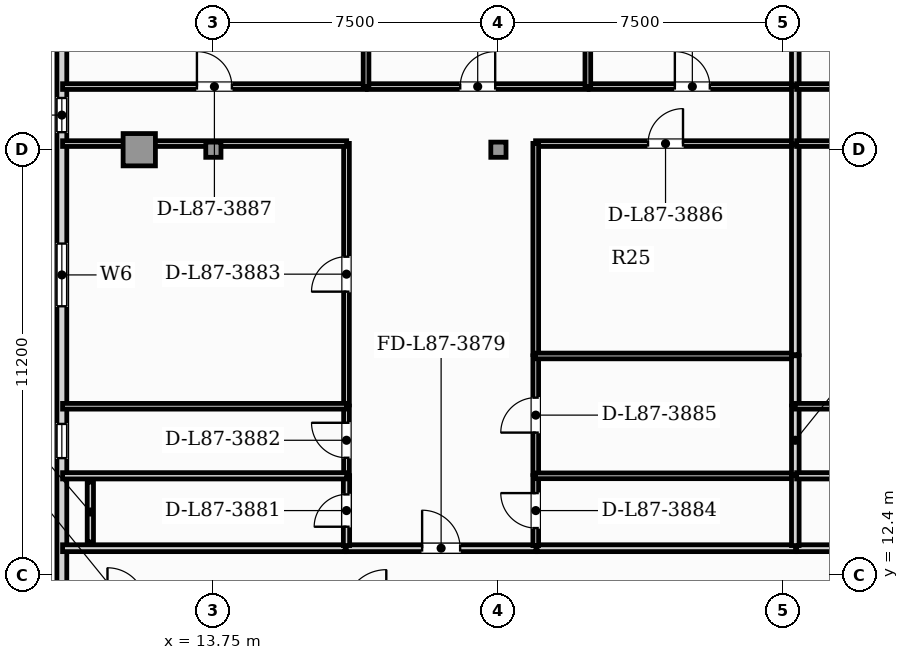
"""IFC4 building model, lengths in metres.
Left out: names, types, materials, properties, quantities, classifications, styles, units other than length and angle.
Written with IfcOpenShell. Run it as: python <this file> out.ifc"""

import sys

from ifc_helpers import new_model, si_unit, direction, frame, frame_2d, origin, origin_2d, place, context, subcontext, project, spatial, rectangle, hollow_rectangle, extrude, element, fill, save


model = new_model("IFC4")
c1 = context("Model", 3, precision=1e-05, world=origin(), true_north=direction((0.0, 1.0)))
c2 = subcontext(c1, "Body", "Model", "MODEL_VIEW")
j1 = project(units=[si_unit("LENGTHUNIT", "METRE"), si_unit("PLANEANGLEUNIT", "RADIAN")], contexts=[c1])
p1 = place(None, origin())
s1 = spatial("IfcSite", under=j1, at=p1, CompositionType="ELEMENT")
p2 = place(p1, origin())
s2 = spatial("IfcBuilding", under=s1, at=p2, CompositionType="ELEMENT")
p3 = place(p2, frame((0.0, 0.0, 353.45)))
s3 = spatial("IfcBuildingStorey", under=s2, at=p3, CompositionType="ELEMENT", Elevation=353.45)
p4 = place(p3, frame((11.8, 23.6, 0.0), z_axis=(0.0, 0.0, 1.0), x_axis=(1.0, 0.0, 0.0)))
e1 = element("IfcColumn", 1, at=p4, inside=s3, PredefinedType="USERDEFINED", context=c2, shape_type="SweptSolid", body=[
    extrude(hollow_rectangle(XDim=0.85, YDim=0.85, WallThickness=0.05, at=origin_2d()), origin(), (0.0, 0.0, 1.0), 4.4),
])
for number, where, z_axis, x_axis in (
    (2, (13.75, 23.6, 0.0), (0.0, 0.0, 1.0), (1.0, 0.0, 0.0)),
    (3, (21.25, 23.6, 0.0), (0.0, 0.0, 1.0), (1.0, 0.0, 0.0)),
):
    element("IfcColumn", number, at=place(p3, frame(where, z_axis=z_axis, x_axis=x_axis)), inside=s3, PredefinedType="COLUMN", context=c2, shape_type="SweptSolid", body=[
        extrude(hollow_rectangle(XDim=0.4, YDim=0.4, WallThickness=0.02, at=origin_2d()), origin(), (0.0, 0.0, 1.0), 4.4),
    ])
p5 = place(p3, frame((9.763, 27.791, 0.0), z_axis=(0.0, 0.0, 1.0), x_axis=(0.0, -1.0, 0.0)))
e4 = element("IfcWall", 4, at=p5, inside=s3, PredefinedType="SOLIDWALL", context=c2, shape_type="SweptSolid", body=[
    extrude(rectangle(XDim=24.551, YDim=0.26, at=frame_2d((12.276, 0.0))), origin(), (0.0, 0.0, 1.0), 4.14),
])
p6 = place(p5, frame((18.651, 0.0, 0.85)))
e5 = element("IfcOpeningElement", 5, at=p6, cuts=e4, PredefinedType="OPENING", context=c2, shape_type="SweptSolid", body=[
    extrude(rectangle(XDim=2.1, YDim=2.05, at=frame_2d((1.05, 1.025))), frame((0.0, 0.14, 0.0), z_axis=(0.0, -1.0, 0.0), x_axis=(1.0, 0.0, 0.0)), (0.0, 0.0, 1.0), 0.28),
])
p7 = place(p5, frame((2.83, 0.0, 0.95)))
e6 = element("IfcOpeningElement", 6, at=p7, cuts=e4, PredefinedType="OPENING", context=c2, shape_type="SweptSolid", body=[
    extrude(rectangle(XDim=0.9, YDim=1.5, at=frame_2d((0.45, 0.75))), frame((0.0, 0.14, 0.0), z_axis=(0.0, -1.0, 0.0), x_axis=(1.0, 0.0, 0.0)), (0.0, 0.0, 1.0), 0.28),
])
p8 = place(p5, frame((11.406, 0.0, 0.95)))
e7 = element("IfcOpeningElement", 7, at=p8, cuts=e4, PredefinedType="OPENING", context=c2, shape_type="SweptSolid", body=[
    extrude(rectangle(XDim=0.9, YDim=1.5, at=frame_2d((0.45, 0.75))), frame((0.0, 0.14, 0.0), z_axis=(0.0, -1.0, 0.0), x_axis=(1.0, 0.0, 0.0)), (0.0, 0.0, 1.0), 0.28),
])
p9 = place(p5, frame((6.661, 0.0, 0.88)))
e8 = element("IfcOpeningElement", 8, at=p9, cuts=e4, PredefinedType="OPENING", context=c2, shape_type="SweptSolid", body=[
    extrude(rectangle(XDim=1.65, YDim=2.0, at=frame_2d((0.825, 1.0))), frame((0.0, 0.14, 0.0), z_axis=(0.0, -1.0, 0.0), x_axis=(1.0, 0.0, 0.0)), (0.0, 0.0, 1.0), 0.28),
])
p10 = place(p3, frame((17.248, 13.115, 0.0), z_axis=(0.0, 0.0, 1.0), x_axis=(1.0, 0.0, 0.0)))
e9 = element("IfcWall", 9, at=p10, inside=s3, PredefinedType="PARTITIONING", context=c2, shape_type="SweptSolid", body=[
    extrude(rectangle(XDim=4.99, YDim=0.18, at=frame_2d((2.495, 0.0))), origin(), (0.0, 0.0, 1.0), 4.14),
])
p11 = place(p10, frame((1.995, 0.0, 0.0)))
e10 = element("IfcOpeningElement", 10, at=p11, cuts=e9, PredefinedType="OPENING", context=c2, shape_type="SweptSolid", body=[
    extrude(rectangle(XDim=1.0, YDim=2.15, at=frame_2d((0.5, 1.075))), frame((0.0, 0.1, 0.0), z_axis=(0.0, -1.0, 0.0), x_axis=(1.0, 0.0, 0.0)), (0.0, 0.0, 1.0), 0.2),
])
p12 = place(p3, frame((9.782, 13.115, 0.0), z_axis=(0.0, 0.0, 1.0), x_axis=(1.0, 0.0, 0.0)))
e11 = element("IfcWall", 11, at=p12, inside=s3, PredefinedType="PARTITIONING", context=c2, shape_type="SweptSolid", body=[
    extrude(rectangle(XDim=7.435, YDim=0.18, at=frame_2d((3.718, 0.0))), origin(), (0.0, 0.0, 1.0), 4.14),
])
p13 = place(p3, frame((22.268, 13.115, 0.0), z_axis=(0.0, 0.0, 1.0), x_axis=(1.0, 0.0, 0.0)))
e12 = element("IfcWall", 12, at=p13, inside=s3, PredefinedType="PARTITIONING", context=c2, shape_type="SweptSolid", body=[
    extrude(rectangle(XDim=6.8, YDim=0.18, at=frame_2d((3.4, 0.0))), origin(), (0.0, 0.0, 1.0), 4.14),
])
p14 = place(p3, frame((29.097, 13.115, 0.0), z_axis=(0.0, 0.0, 1.0), x_axis=(1.0, 0.0, 0.0)))
e13 = element("IfcWall", 13, at=p14, inside=s3, PredefinedType="PARTITIONING", context=c2, shape_type="SweptSolid", body=[
    extrude(rectangle(XDim=6.373, YDim=0.18, at=frame_2d((3.187, 0.0))), origin(), (0.0, 0.0, 1.0), 4.14),
])
p15 = place(p3, frame((17.252, 13.185, 0.0), z_axis=(0.0, 0.0, 1.0), x_axis=(0.0, 1.0, 0.0)))
e14 = element("IfcWall", 14, at=p15, inside=s3, PredefinedType="PLUMBINGWALL", context=c2, shape_type="SweptSolid", body=[
    extrude(rectangle(XDim=1.84, YDim=0.165, at=frame_2d((0.92, 0.0))), origin(), (0.0, 0.0, 1.0), 4.14),
])
p16 = place(p15, frame((0.495, 0.0, 0.0)))
e15 = element("IfcOpeningElement", 15, at=p16, cuts=e14, PredefinedType="OPENING", context=c2, shape_type="SweptSolid", body=[
    extrude(rectangle(XDim=0.85, YDim=2.1, at=frame_2d((0.425, 1.05))), frame((0.0, 0.093, 0.0), z_axis=(0.0, -1.0, 0.0), x_axis=(1.0, 0.0, 0.0)), (0.0, 0.0, 1.0), 0.185),
])
p17 = place(p3, frame((17.252, 15.055, 0.0), z_axis=(0.0, 0.0, 1.0), x_axis=(0.0, 1.0, 0.0)))
e16 = element("IfcWall", 16, at=p17, inside=s3, PredefinedType="PARTITIONING", context=c2, shape_type="SweptSolid", body=[
    extrude(rectangle(XDim=1.8, YDim=0.15, at=frame_2d((0.9, 0.0))), origin(), (0.0, 0.0, 1.0), 4.14),
])
p18 = place(p17, frame((0.44, 0.0, 0.0)))
e17 = element("IfcOpeningElement", 17, at=p18, cuts=e16, PredefinedType="OPENING", context=c2, shape_type="SweptSolid", body=[
    extrude(rectangle(XDim=0.92, YDim=2.1, at=frame_2d((0.46, 1.05))), frame((0.0, 0.085, 0.0), z_axis=(0.0, -1.0, 0.0), x_axis=(1.0, 0.0, 0.0)), (0.0, 0.0, 1.0), 0.17),
])
p19 = place(p3, frame((17.252, 16.885, 0.0), z_axis=(0.0, 0.0, 1.0), x_axis=(0.0, 1.0, 0.0)))
e18 = element("IfcWall", 18, at=p19, inside=s3, PredefinedType="PARTITIONING", context=c2, shape_type="SweptSolid", body=[
    extrude(rectangle(XDim=6.881, YDim=0.15, at=frame_2d((3.44, 0.0))), origin(), (0.0, 0.0, 1.0), 4.14),
])
p20 = place(p19, frame((2.981, 0.0, 0.0)))
e19 = element("IfcOpeningElement", 19, at=p20, cuts=e18, PredefinedType="OPENING", context=c2, shape_type="SweptSolid", body=[
    extrude(rectangle(XDim=0.92, YDim=2.1, at=frame_2d((0.46, 1.05))), frame((0.0, 0.085, 0.0), z_axis=(0.0, -1.0, 0.0), x_axis=(1.0, 0.0, 0.0)), (0.0, 0.0, 1.0), 0.17),
])
p21 = place(p3, frame((9.782, 23.761, 0.0), z_axis=(0.0, 0.0, 1.0), x_axis=(1.0, 0.0, 0.0)))
e20 = element("IfcWall", 20, at=p21, inside=s3, PredefinedType="PARTITIONING", context=c2, shape_type="SweptSolid", body=[
    extrude(rectangle(XDim=7.475, YDim=0.15, at=frame_2d((3.738, 0.0))), origin(), (0.0, 0.0, 1.0), 3.607),
])
p22 = place(p3, frame((22.232, 13.185, 0.0), z_axis=(0.0, 0.0, 1.0), x_axis=(0.0, 1.0, 0.0)))
e21 = element("IfcWall", 21, at=p22, inside=s3, PredefinedType="PARTITIONING", context=c2, shape_type="SweptSolid", body=[
    extrude(rectangle(XDim=1.84, YDim=0.15, at=frame_2d((0.92, 0.0))), origin(), (0.0, 0.0, 1.0), 4.14),
])
p23 = place(p22, frame((0.46, 0.0, 0.0)))
e22 = element("IfcOpeningElement", 22, at=p23, cuts=e21, PredefinedType="OPENING", context=c2, shape_type="SweptSolid", body=[
    extrude(rectangle(XDim=0.92, YDim=2.1, at=frame_2d((0.46, 1.05))), frame((0.0, 0.085, 0.0), z_axis=(0.0, -1.0, 0.0), x_axis=(1.0, 0.0, 0.0)), (0.0, 0.0, 1.0), 0.17),
])
p24 = place(p3, frame((22.232, 15.055, 0.0), z_axis=(0.0, 0.0, 1.0), x_axis=(0.0, 1.0, 0.0)))
e23 = element("IfcWall", 23, at=p24, inside=s3, PredefinedType="PARTITIONING", context=c2, shape_type="SweptSolid", body=[
    extrude(rectangle(XDim=3.124, YDim=0.15, at=frame_2d((1.562, 0.0))), origin(), (0.0, 0.0, 1.0), 4.14),
])
p25 = place(p24, frame((1.102, 0.0, 0.0)))
e24 = element("IfcOpeningElement", 24, at=p25, cuts=e23, PredefinedType="OPENING", context=c2, shape_type="SweptSolid", body=[
    extrude(rectangle(XDim=0.92, YDim=2.1, at=frame_2d((0.46, 1.05))), frame((0.0, 0.085, 0.0), z_axis=(0.0, -1.0, 0.0), x_axis=(1.0, 0.0, 0.0)), (0.0, 0.0, 1.0), 0.17),
])
p26 = place(p3, frame((22.228, 23.761, 0.0), z_axis=(0.0, 0.0, 1.0), x_axis=(1.0, 0.0, 0.0)))
e25 = element("IfcWall", 25, at=p26, inside=s3, PredefinedType="PARTITIONING", context=c2, shape_type="SweptSolid", body=[
    extrude(rectangle(XDim=6.84, YDim=0.15, at=frame_2d((3.42, 0.0))), origin(), (0.0, 0.0, 1.0), 3.24),
])
p27 = place(p26, frame((2.96, 0.0, 0.0)))
e26 = element("IfcOpeningElement", 26, at=p27, cuts=e25, PredefinedType="OPENING", context=c2, shape_type="SweptSolid", body=[
    extrude(rectangle(XDim=0.92, YDim=2.1, at=frame_2d((0.46, 1.05))), frame((0.0, 0.085, 0.0), z_axis=(0.0, -1.0, 0.0), x_axis=(1.0, 0.0, 0.0)), (0.0, 0.0, 1.0), 0.17),
])
p28 = place(p3, frame((22.232, 18.208, 0.0), z_axis=(0.0, 0.0, 1.0), x_axis=(0.0, 1.0, 0.0)))
e27 = element("IfcWall", 27, at=p28, inside=s3, PredefinedType="PARTITIONING", context=c2, shape_type="SweptSolid", body=[
    extrude(rectangle(XDim=5.558, YDim=0.15, at=frame_2d((2.779, 0.0))), origin(), (0.0, 0.0, 1.0), 4.14),
])
p29 = place(p3, frame((9.782, 25.261, 0.0), z_axis=(0.0, 0.0, 1.0), x_axis=(1.0, 0.0, 0.0)))
e28 = element("IfcWall", 28, at=p29, inside=s3, PredefinedType="PARTITIONING", context=c2, shape_type="SweptSolid", body=[
    extrude(rectangle(XDim=7.99, YDim=0.15, at=frame_2d((3.995, 0.0))), origin(), (0.0, 0.0, 1.0), 4.14),
])
p30 = place(p29, frame((3.535, 0.0, 0.0)))
e29 = element("IfcOpeningElement", 29, at=p30, cuts=e28, PredefinedType="OPENING", context=c2, shape_type="SweptSolid", body=[
    extrude(rectangle(XDim=0.92, YDim=2.1, at=frame_2d((0.46, 1.05))), frame((0.0, 0.085, 0.0), z_axis=(0.0, -1.0, 0.0), x_axis=(1.0, 0.0, 0.0)), (0.0, 0.0, 1.0), 0.17),
])
p31 = place(p3, frame((17.802, 25.261, 0.0), z_axis=(0.0, 0.0, 1.0), x_axis=(1.0, 0.0, 0.0)))
e30 = element("IfcWall", 30, at=p31, inside=s3, PredefinedType="PARTITIONING", context=c2, shape_type="SweptSolid", body=[
    extrude(rectangle(XDim=5.806, YDim=0.15, at=frame_2d((2.903, 0.0))), origin(), (0.0, 0.0, 1.0), 4.14),
])
p32 = place(p31, frame((2.443, 0.0, 0.0)))
e31 = element("IfcOpeningElement", 31, at=p32, cuts=e30, PredefinedType="OPENING", context=c2, shape_type="SweptSolid", body=[
    extrude(rectangle(XDim=0.92, YDim=2.1, at=frame_2d((0.46, 1.05))), frame((0.0, 0.085, 0.0), z_axis=(0.0, -1.0, 0.0), x_axis=(1.0, 0.0, 0.0)), (0.0, 0.0, 1.0), 0.17),
])
p33 = place(p3, frame((23.638, 25.261, 0.0), z_axis=(0.0, 0.0, 1.0), x_axis=(1.0, 0.0, 0.0)))
e32 = element("IfcWall", 32, at=p33, inside=s3, PredefinedType="PARTITIONING", context=c2, shape_type="SweptSolid", body=[
    extrude(rectangle(XDim=5.429, YDim=0.15, at=frame_2d((2.714, 0.0))), origin(), (0.0, 0.0, 1.0), 4.14),
])
p34 = place(p33, frame((2.254, 0.0, 0.0)))
e33 = element("IfcOpeningElement", 33, at=p34, cuts=e32, PredefinedType="OPENING", context=c2, shape_type="SweptSolid", body=[
    extrude(rectangle(XDim=0.92, YDim=2.1, at=frame_2d((0.46, 1.05))), frame((0.0, 0.085, 0.0), z_axis=(0.0, -1.0, 0.0), x_axis=(1.0, 0.0, 0.0)), (0.0, 0.0, 1.0), 0.17),
])
p35 = place(p3, frame((29.062, 23.756, 0.0), z_axis=(0.0, 0.0, 1.0), x_axis=(0.0, 1.0, 0.0)))
e34 = element("IfcWall", 34, at=p35, inside=s3, PredefinedType="PARTITIONING", context=c2, shape_type="SweptSolid", body=[
    extrude(rectangle(XDim=1.51, YDim=0.2, at=frame_2d((0.755, 0.0))), origin(), (0.0, 0.0, 1.0), 4.14),
])
p36 = place(p3, frame((9.782, 15.02, 0.0), z_axis=(0.0, 0.0, 1.0), x_axis=(1.0, 0.0, 0.0)))
e35 = element("IfcWall", 35, at=p36, inside=s3, PredefinedType="PLUMBINGWALL", context=c2, shape_type="SweptSolid", body=[
    extrude(rectangle(XDim=7.475, YDim=0.165, at=frame_2d((3.738, 0.0))), origin(), (0.0, 0.0, 1.0), 4.14),
])
p37 = place(p3, frame((9.782, 16.85, 0.0), z_axis=(0.0, 0.0, 1.0), x_axis=(1.0, 0.0, 0.0)))
e36 = element("IfcWall", 36, at=p37, inside=s3, PredefinedType="PARTITIONING", context=c2, shape_type="SweptSolid", body=[
    extrude(rectangle(XDim=7.475, YDim=0.15, at=frame_2d((3.738, 0.0))), origin(), (0.0, 0.0, 1.0), 4.14),
])
p38 = place(p3, frame((22.228, 15.02, 0.0), z_axis=(0.0, 0.0, 1.0), x_axis=(1.0, 0.0, 0.0)))
e37 = element("IfcWall", 37, at=p38, inside=s3, PredefinedType="PARTITIONING", context=c2, shape_type="SweptSolid", body=[
    extrude(rectangle(XDim=6.84, YDim=0.15, at=frame_2d((3.42, 0.0))), origin(), (0.0, 0.0, 1.0), 4.14),
])
p39 = place(p3, frame((29.062, 13.185, 0.0), z_axis=(0.0, 0.0, 1.0), x_axis=(0.0, 1.0, 0.0)))
e38 = element("IfcWall", 38, at=p39, inside=s3, PredefinedType="PARTITIONING", context=c2, shape_type="SweptSolid", body=[
    extrude(rectangle(XDim=1.84, YDim=0.2, at=frame_2d((0.92, 0.0))), origin(), (0.0, 0.0, 1.0), 4.14),
])
p40 = place(p3, frame((22.228, 18.173, 0.0), z_axis=(0.0, 0.0, 1.0), x_axis=(1.0, 0.0, 0.0)))
e39 = element("IfcWall", 39, at=p40, inside=s3, PredefinedType="PARTITIONING", context=c2, shape_type="SweptSolid", body=[
    extrude(rectangle(XDim=6.84, YDim=0.15, at=frame_2d((3.42, 0.0))), origin(), (0.0, 0.0, 1.0), 4.14),
])
p41 = place(p3, frame((29.062, 15.055, 0.0), z_axis=(0.0, 0.0, 1.0), x_axis=(0.0, 1.0, 0.0)))
e40 = element("IfcWall", 40, at=p41, inside=s3, PredefinedType="PARTITIONING", context=c2, shape_type="SweptSolid", body=[
    extrude(rectangle(XDim=1.8, YDim=0.2, at=frame_2d((0.9, 0.0))), origin(), (0.0, 0.0, 1.0), 4.14),
])
p42 = place(p3, frame((29.062, 16.885, 0.0), z_axis=(0.0, 0.0, 1.0), x_axis=(0.0, 1.0, 0.0)))
e41 = element("IfcWall", 41, at=p42, inside=s3, PredefinedType="PARTITIONING", context=c2, shape_type="SweptSolid", body=[
    extrude(rectangle(XDim=1.293, YDim=0.2, at=frame_2d((0.647, 0.0))), origin(), (0.0, 0.0, 1.0), 4.14),
])
p43 = place(p3, frame((29.062, 18.208, 0.0), z_axis=(0.0, 0.0, 1.0), x_axis=(0.0, 1.0, 0.0)))
e42 = element("IfcWall", 42, at=p43, inside=s3, PredefinedType="PARTITIONING", context=c2, shape_type="SweptSolid", body=[
    extrude(rectangle(XDim=5.518, YDim=0.2, at=frame_2d((2.759, 0.0))), origin(), (0.0, 0.0, 1.0), 4.14),
])
for number, where, z_axis, x_axis in (
    (43, (17.767, 25.256, 0.0), (0.0, 0.0, 1.0), (0.0, 1.0, 0.0)),
    (44, (23.603, 25.256, 0.0), (0.0, 0.0, 1.0), (0.0, 1.0, 0.0)),
):
    element("IfcWall", number, at=place(p3, frame(where, z_axis=z_axis, x_axis=x_axis)), inside=s3, PredefinedType="PARTITIONING", context=c2, shape_type="SweptSolid", body=[
        extrude(rectangle(XDim=5.625, YDim=0.15, at=frame_2d((2.813, 0.0))), origin(), (0.0, 0.0, 1.0), 4.14),
    ])
p44 = place(p3, frame((29.062, 25.296, 0.0), z_axis=(0.0, 0.0, 1.0), x_axis=(0.0, 1.0, 0.0)))
e45 = element("IfcWall", 45, at=p44, inside=s3, PredefinedType="PARTITIONING", context=c2, shape_type="SweptSolid", body=[
    extrude(rectangle(XDim=5.585, YDim=0.2, at=frame_2d((2.793, 0.0))), origin(), (0.0, 0.0, 1.0), 4.14),
])
p45 = place(p3, frame((29.097, 23.761, 0.0), z_axis=(0.0, 0.0, 1.0), x_axis=(1.0, 0.0, 0.0)))
e46 = element("IfcWall", 46, at=p45, inside=s3, PredefinedType="PARTITIONING", context=c2, shape_type="SweptSolid", body=[
    extrude(rectangle(XDim=6.413, YDim=0.15, at=frame_2d((3.207, 0.0))), origin(), (0.0, 0.0, 1.0), 3.24),
])
p46 = place(p3, frame((29.097, 25.261, 0.0), z_axis=(0.0, 0.0, 1.0), x_axis=(1.0, 0.0, 0.0)))
e47 = element("IfcWall", 47, at=p46, inside=s3, PredefinedType="PARTITIONING", context=c2, shape_type="SweptSolid", body=[
    extrude(rectangle(XDim=7.158, YDim=0.15, at=frame_2d((3.579, 0.0))), origin(), (0.0, 0.0, 1.0), 4.14),
])
p47 = place(p46, frame((3.119, 0.0, 0.0)))
e48 = element("IfcOpeningElement", 48, at=p47, cuts=e47, PredefinedType="OPENING", context=c2, shape_type="SweptSolid", body=[
    extrude(rectangle(XDim=0.92, YDim=2.1, at=frame_2d((0.46, 1.05))), frame((0.0, 0.085, 0.0), z_axis=(0.0, -1.0, 0.0), x_axis=(1.0, 0.0, 0.0)), (0.0, 0.0, 1.0), 0.17),
])
p48 = place(p3, frame((29.097, 15.02, 0.0), z_axis=(0.0, 0.0, 1.0), x_axis=(1.0, 0.0, 0.0)))
e49 = element("IfcWall", 49, at=p48, inside=s3, PredefinedType="PLUMBINGWALL", context=c2, shape_type="SweptSolid", body=[
    extrude(rectangle(XDim=6.413, YDim=0.165, at=frame_2d((3.207, 0.0))), origin(), (0.0, 0.0, 1.0), 4.14),
])
p49 = place(p3, frame((29.057, 16.85, 0.0), z_axis=(0.0, 0.0, 1.0), x_axis=(1.0, 0.0, 0.0)))
e50 = element("IfcWall", 50, at=p49, inside=s3, PredefinedType="PARTITIONING", context=c2, shape_type="SweptSolid", body=[
    extrude(rectangle(XDim=6.453, YDim=0.15, at=frame_2d((3.227, 0.0))), origin(), (0.0, 0.0, 1.0), 4.14),
])
p50 = place(p3, frame((10.513, 13.28, 0.0), z_axis=(0.0, 0.0, 1.0), x_axis=(0.0, 1.0, 0.0)))
e51 = element("IfcWall", 51, at=p50, inside=s3, PredefinedType="PLUMBINGWALL", context=c2, shape_type="SweptSolid", body=[
    extrude(rectangle(XDim=1.575, YDim=0.165, at=frame_2d((0.788, 0.0))), origin(), (0.0, 0.0, 1.0), 4.14),
])
p51 = place(p7, origin())
e52 = element("IfcWindow", 52, at=p51, inside=s3, PartitioningType="SINGLE_PANEL", PredefinedType="WINDOW", context=c2, shape_type="SweptSolid", body=[
    extrude(rectangle(XDim=0.9, YDim=1.5, at=frame_2d((0.45, 0.75))), frame((0.0, 0.03, 0.0), z_axis=(0.0, -1.0, 0.0), x_axis=(1.0, 0.0, 0.0)), (0.0, 0.0, 1.0), 0.06),
])
fill(e6, e52)
p52 = place(p8, origin())
e53 = element("IfcWindow", 53, at=p52, inside=s3, PartitioningType="SINGLE_PANEL", PredefinedType="WINDOW", context=c2, shape_type="SweptSolid", body=[
    extrude(rectangle(XDim=0.9, YDim=1.5, at=frame_2d((0.45, 0.75))), frame((0.0, 0.03, 0.0), z_axis=(0.0, -1.0, 0.0), x_axis=(1.0, 0.0, 0.0)), (0.0, 0.0, 1.0), 0.06),
])
fill(e7, e53)
p53 = place(p9, origin())
e54 = element("IfcWindow", 54, at=p53, inside=s3, PartitioningType="SINGLE_PANEL", PredefinedType="WINDOW", context=c2, shape_type="SweptSolid", body=[
    extrude(rectangle(XDim=1.65, YDim=2.0, at=frame_2d((0.825, 1.0))), frame((0.0, 0.03, 0.0), z_axis=(0.0, -1.0, 0.0), x_axis=(1.0, 0.0, 0.0)), (0.0, 0.0, 1.0), 0.06),
])
fill(e8, e54)
p54 = place(p11, origin())
e55 = element("IfcDoor", 55, at=p54, inside=s3, OperationType="SINGLE_SWING_LEFT", PredefinedType="DOOR", context=c2, shape_type="SweptSolid", body=[
    extrude(rectangle(XDim=1.0, YDim=2.15, at=frame_2d((0.5, 1.075))), frame((0.0, 0.025, 0.0), z_axis=(0.0, -1.0, 0.0), x_axis=(1.0, 0.0, 0.0)), (0.0, 0.0, 1.0), 0.05),
])
fill(e10, e55)
p55 = place(p16, origin())
e56 = element("IfcDoor", 56, at=p55, inside=s3, OperationType="SINGLE_SWING_LEFT", PredefinedType="DOOR", context=c2, shape_type="SweptSolid", body=[
    extrude(rectangle(XDim=0.85, YDim=2.1, at=frame_2d((0.425, 1.05))), frame((0.0, 0.025, 0.0), z_axis=(0.0, -1.0, 0.0), x_axis=(1.0, 0.0, 0.0)), (0.0, 0.0, 1.0), 0.05),
])
fill(e15, e56)
p56 = place(p18, origin())
e57 = element("IfcDoor", 57, at=p56, inside=s3, OperationType="SINGLE_SWING_RIGHT", PredefinedType="DOOR", context=c2, shape_type="SweptSolid", body=[
    extrude(rectangle(XDim=0.92, YDim=2.1, at=frame_2d((0.46, 1.05))), frame((0.0, 0.025, 0.0), z_axis=(0.0, -1.0, 0.0), x_axis=(1.0, 0.0, 0.0)), (0.0, 0.0, 1.0), 0.05),
])
fill(e17, e57)
p57 = place(p20, origin())
e58 = element("IfcDoor", 58, at=p57, inside=s3, OperationType="SINGLE_SWING_LEFT", PredefinedType="DOOR", context=c2, shape_type="SweptSolid", body=[
    extrude(rectangle(XDim=0.92, YDim=2.1, at=frame_2d((0.46, 1.05))), frame((0.0, 0.025, 0.0), z_axis=(0.0, -1.0, 0.0), x_axis=(1.0, 0.0, 0.0)), (0.0, 0.0, 1.0), 0.05),
])
fill(e19, e58)
p58 = place(p23, origin())
e59 = element("IfcDoor", 59, at=p58, inside=s3, OperationType="SINGLE_SWING_RIGHT", PredefinedType="DOOR", context=c2, shape_type="SweptSolid", body=[
    extrude(rectangle(XDim=0.92, YDim=2.1, at=frame_2d((0.46, 1.05))), frame((0.0, 0.025, 0.0), z_axis=(0.0, -1.0, 0.0), x_axis=(1.0, 0.0, 0.0)), (0.0, 0.0, 1.0), 0.05),
])
fill(e22, e59)
p59 = place(p25, origin())
e60 = element("IfcDoor", 60, at=p59, inside=s3, OperationType="SINGLE_SWING_LEFT", PredefinedType="DOOR", context=c2, shape_type="SweptSolid", body=[
    extrude(rectangle(XDim=0.92, YDim=2.1, at=frame_2d((0.46, 1.05))), frame((0.0, 0.025, 0.0), z_axis=(0.0, -1.0, 0.0), x_axis=(1.0, 0.0, 0.0)), (0.0, 0.0, 1.0), 0.05),
])
fill(e24, e60)
p60 = place(p27, origin())
e61 = element("IfcDoor", 61, at=p60, inside=s3, OperationType="SINGLE_SWING_RIGHT", PredefinedType="DOOR", context=c2, shape_type="SweptSolid", body=[
    extrude(rectangle(XDim=0.92, YDim=2.1, at=frame_2d((0.46, 1.05))), frame((0.0, 0.025, 0.0), z_axis=(0.0, -1.0, 0.0), x_axis=(1.0, 0.0, 0.0)), (0.0, 0.0, 1.0), 0.05),
])
fill(e26, e61)
p61 = place(p30, origin())
e62 = element("IfcDoor", 62, at=p61, inside=s3, OperationType="SINGLE_SWING_LEFT", PredefinedType="DOOR", context=c2, shape_type="SweptSolid", body=[
    extrude(rectangle(XDim=0.92, YDim=2.1, at=frame_2d((0.46, 1.05))), frame((0.0, 0.025, 0.0), z_axis=(0.0, -1.0, 0.0), x_axis=(1.0, 0.0, 0.0)), (0.0, 0.0, 1.0), 0.05),
])
fill(e29, e62)
p62 = place(p32, origin())
e63 = element("IfcDoor", 63, at=p62, inside=s3, OperationType="SINGLE_SWING_RIGHT", PredefinedType="DOOR", context=c2, shape_type="SweptSolid", body=[
    extrude(rectangle(XDim=0.92, YDim=2.1, at=frame_2d((0.46, 1.05))), frame((0.0, 0.025, 0.0), z_axis=(0.0, -1.0, 0.0), x_axis=(1.0, 0.0, 0.0)), (0.0, 0.0, 1.0), 0.05),
])
fill(e31, e63)
p63 = place(p34, origin())
e64 = element("IfcDoor", 64, at=p63, inside=s3, OperationType="SINGLE_SWING_LEFT", PredefinedType="DOOR", context=c2, shape_type="SweptSolid", body=[
    extrude(rectangle(XDim=0.92, YDim=2.1, at=frame_2d((0.46, 1.05))), frame((0.0, 0.025, 0.0), z_axis=(0.0, -1.0, 0.0), x_axis=(1.0, 0.0, 0.0)), (0.0, 0.0, 1.0), 0.05),
])
fill(e33, e64)
save(model, sys.argv[1])
